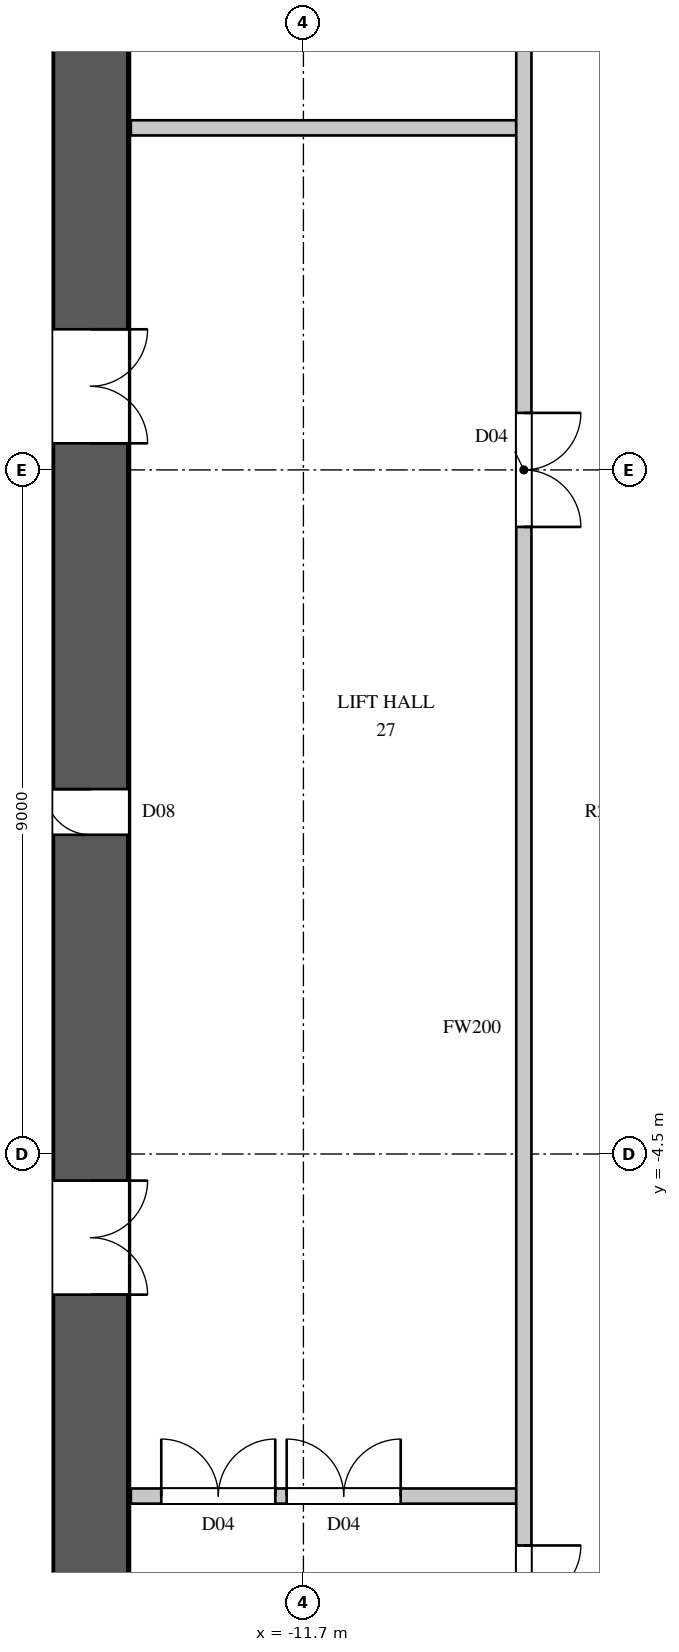
"""IFC4 building model, lengths in metres.
Left out: names, types, materials, properties, quantities, classifications, styles, units other than length and angle.
Written with IfcOpenShell. Run it as: python <this file> out.ifc"""

import sys

from ifc_helpers import new_model, si_unit, direction, frame, frame_2d, origin, place, context, subcontext, project, spatial, rectangle, extrude, element, fill, save


model = new_model("IFC4")
c1 = context("Model", 3, precision=1e-05, world=origin(), true_north=direction((0.0, 1.0)))
c2 = subcontext(c1, "Body", "Model", "MODEL_VIEW")
j1 = project(units=[si_unit("LENGTHUNIT", "METRE"), si_unit("PLANEANGLEUNIT", "RADIAN")], contexts=[c1])
p1 = place(None, origin())
s1 = spatial("IfcSite", under=j1, at=p1, CompositionType="ELEMENT")
p2 = place(p1, origin())
s2 = spatial("IfcBuilding", under=s1, at=p2, CompositionType="ELEMENT")
p3 = place(p2, frame((0.0, 0.0, 127.5)))
s3 = spatial("IfcBuildingStorey", under=s2, at=p3, CompositionType="ELEMENT", Elevation=127.5)
p4 = place(p3, frame((-14.5, -14.8, 0.0), z_axis=(0.0, 0.0, 1.0), x_axis=(0.0, 1.0, 0.0)))
e1 = element("IfcWall", 1, at=p4, inside=s3, PredefinedType="SHEAR", context=c2, shape_type="SweptSolid", body=[
    extrude(rectangle(XDim=29.6, YDim=1.0, at=frame_2d((14.8, 0.0))), origin(), (0.0, 0.0, 1.0), 3.6),
])
p5 = place(p4, frame((8.45, 0.0, 0.0)))
e2 = element("IfcOpeningElement", 2, at=p5, cuts=e1, PredefinedType="OPENING", context=c2, shape_type="SweptSolid", body=[
    extrude(rectangle(XDim=1.5, YDim=2.4, at=frame_2d((0.75, 1.2))), frame((0.0, 0.51, 0.0), z_axis=(0.0, -1.0, 0.0), x_axis=(1.0, 0.0, 0.0)), (0.0, 0.0, 1.0), 1.02),
])
p6 = place(p4, frame((19.65, 0.0, 0.0)))
e3 = element("IfcOpeningElement", 3, at=p6, cuts=e1, PredefinedType="OPENING", context=c2, shape_type="SweptSolid", body=[
    extrude(rectangle(XDim=1.5, YDim=2.4, at=frame_2d((0.75, 1.2))), frame((0.0, 0.51, 0.0), z_axis=(0.0, -1.0, 0.0), x_axis=(1.0, 0.0, 0.0)), (0.0, 0.0, 1.0), 1.02),
])
p7 = place(p4, frame((14.5, 0.0, 0.0)))
e4 = element("IfcOpeningElement", 4, at=p7, cuts=e1, PredefinedType="OPENING", context=c2, shape_type="SweptSolid", body=[
    extrude(rectangle(XDim=0.6, YDim=2.0, at=frame_2d((0.3, 1.0))), frame((0.0, 0.51, 0.0), z_axis=(0.0, -1.0, 0.0), x_axis=(1.0, 0.0, 0.0)), (0.0, 0.0, 1.0), 1.02),
])
p8 = place(p3, frame((-13.97, -9.0, 0.0), z_axis=(0.0, 0.0, 1.0), x_axis=(1.0, 0.0, 0.0)))
e5 = element("IfcWall", 5, at=p8, inside=s3, PredefinedType="PARTITIONING", context=c2, shape_type="SweptSolid", body=[
    extrude(rectangle(XDim=5.07, YDim=0.2, at=frame_2d((2.535, 0.0))), origin(), (0.0, 0.0, 1.0), 3.3),
])
p9 = place(p8, frame((0.4, 0.0, 0.0)))
e6 = element("IfcOpeningElement", 6, at=p9, cuts=e5, PredefinedType="OPENING", context=c2, shape_type="SweptSolid", body=[
    extrude(rectangle(XDim=1.5, YDim=2.2, at=frame_2d((0.75, 1.1))), frame((0.0, 0.11, 0.0), z_axis=(0.0, -1.0, 0.0), x_axis=(1.0, 0.0, 0.0)), (0.0, 0.0, 1.0), 0.22),
])
p10 = place(p8, frame((2.05, 0.0, 0.0)))
e7 = element("IfcOpeningElement", 7, at=p10, cuts=e5, PredefinedType="OPENING", context=c2, shape_type="SweptSolid", body=[
    extrude(rectangle(XDim=1.5, YDim=2.2, at=frame_2d((0.75, 1.1))), frame((0.0, 0.11, 0.0), z_axis=(0.0, -1.0, 0.0), x_axis=(1.0, 0.0, 0.0)), (0.0, 0.0, 1.0), 0.22),
])
p11 = place(p3, frame((-13.97, 9.0, 0.0), z_axis=(0.0, 0.0, 1.0), x_axis=(1.0, 0.0, 0.0)))
e8 = element("IfcWall", 8, at=p11, inside=s3, PredefinedType="PARTITIONING", context=c2, shape_type="SweptSolid", body=[
    extrude(rectangle(XDim=5.07, YDim=0.2, at=frame_2d((2.535, 0.0))), origin(), (0.0, 0.0, 1.0), 3.3),
])
p12 = place(p3, frame((-8.8, -17.4, 0.0), z_axis=(0.0, 0.0, 1.0), x_axis=(0.0, 1.0, 0.0)))
e9 = element("IfcWall", 9, at=p12, inside=s3, PredefinedType="PARTITIONING", context=c2, shape_type="SweptSolid", body=[
    extrude(rectangle(XDim=29.1, YDim=0.2, at=frame_2d((14.55, 0.0))), origin(), (0.0, 0.0, 1.0), 3.3),
])
p13 = place(p12, frame((21.15, 0.0, 0.0)))
e10 = element("IfcOpeningElement", 10, at=p13, cuts=e9, PredefinedType="OPENING", context=c2, shape_type="SweptSolid", body=[
    extrude(rectangle(XDim=1.5, YDim=2.2, at=frame_2d((0.75, 1.1))), frame((0.0, 0.11, 0.0), z_axis=(0.0, -1.0, 0.0), x_axis=(1.0, 0.0, 0.0)), (0.0, 0.0, 1.0), 0.22),
])
p14 = place(p12, frame((6.25, 0.0, 0.0)))
e11 = element("IfcOpeningElement", 11, at=p14, cuts=e9, PredefinedType="OPENING", context=c2, shape_type="SweptSolid", body=[
    extrude(rectangle(XDim=1.5, YDim=2.2, at=frame_2d((0.75, 1.1))), frame((0.0, 0.11, 0.0), z_axis=(0.0, -1.0, 0.0), x_axis=(1.0, 0.0, 0.0)), (0.0, 0.0, 1.0), 0.22),
])
p15 = place(p12, frame((27.45, 0.0, 0.0)))
e12 = element("IfcOpeningElement", 12, at=p15, cuts=e9, PredefinedType="OPENING", context=c2, shape_type="SweptSolid", body=[
    extrude(rectangle(XDim=1.5, YDim=2.2, at=frame_2d((0.75, 1.1))), frame((0.0, 0.11, 0.0), z_axis=(0.0, -1.0, 0.0), x_axis=(1.0, 0.0, 0.0)), (0.0, 0.0, 1.0), 0.22),
])
p16 = place(p12, frame((0.15, 0.0, 0.0)))
e13 = element("IfcOpeningElement", 13, at=p16, cuts=e9, PredefinedType="OPENING", context=c2, shape_type="SweptSolid", body=[
    extrude(rectangle(XDim=0.9, YDim=2.2, at=frame_2d((0.45, 1.1))), frame((0.0, 0.11, 0.0), z_axis=(0.0, -1.0, 0.0), x_axis=(1.0, 0.0, 0.0)), (0.0, 0.0, 1.0), 0.22),
])
p17 = place(p13, origin())
e14 = element("IfcDoor", 14, at=p17, inside=s3, OperationType="DOUBLE_DOOR_SINGLE_SWING", PredefinedType="DOOR", context=c2, shape_type="SweptSolid", body=[
    extrude(rectangle(XDim=1.5, YDim=2.2, at=frame_2d((0.75, 1.1))), frame((0.0, 0.025, 0.0), z_axis=(0.0, -1.0, 0.0), x_axis=(1.0, 0.0, 0.0)), (0.0, 0.0, 1.0), 0.05),
])
fill(e10, e14)
p18 = place(p9, origin())
e15 = element("IfcDoor", 15, at=p18, inside=s3, OperationType="DOUBLE_DOOR_SINGLE_SWING", PredefinedType="DOOR", context=c2, shape_type="SweptSolid", body=[
    extrude(rectangle(XDim=1.5, YDim=2.2, at=frame_2d((0.75, 1.1))), frame((0.0, 0.025, 0.0), z_axis=(0.0, -1.0, 0.0), x_axis=(1.0, 0.0, 0.0)), (0.0, 0.0, 1.0), 0.05),
])
fill(e6, e15)
p19 = place(p10, origin())
e16 = element("IfcDoor", 16, at=p19, inside=s3, OperationType="DOUBLE_DOOR_SINGLE_SWING", PredefinedType="DOOR", context=c2, shape_type="SweptSolid", body=[
    extrude(rectangle(XDim=1.5, YDim=2.2, at=frame_2d((0.75, 1.1))), frame((0.0, 0.025, 0.0), z_axis=(0.0, -1.0, 0.0), x_axis=(1.0, 0.0, 0.0)), (0.0, 0.0, 1.0), 0.05),
])
fill(e7, e16)
p20 = place(p14, origin())
e17 = element("IfcDoor", 17, at=p20, inside=s3, OperationType="DOUBLE_DOOR_SINGLE_SWING", PredefinedType="DOOR", context=c2, shape_type="SweptSolid", body=[
    extrude(rectangle(XDim=1.5, YDim=2.2, at=frame_2d((0.75, 1.1))), frame((0.0, 0.025, 0.0), z_axis=(0.0, -1.0, 0.0), x_axis=(1.0, 0.0, 0.0)), (0.0, 0.0, 1.0), 0.05),
])
fill(e11, e17)
p21 = place(p5, origin())
e18 = element("IfcDoor", 18, at=p21, inside=s3, OperationType="DOUBLE_DOOR_SINGLE_SWING", PredefinedType="DOOR", context=c2, shape_type="SweptSolid", body=[
    extrude(rectangle(XDim=1.5, YDim=2.4, at=frame_2d((0.75, 1.2))), frame((0.0, -0.445, 0.0), z_axis=(0.0, -1.0, 0.0), x_axis=(1.0, 0.0, 0.0)), (0.0, 0.0, 1.0), 0.05),
])
fill(e2, e18)
p22 = place(p6, origin())
e19 = element("IfcDoor", 19, at=p22, inside=s3, OperationType="DOUBLE_DOOR_SINGLE_SWING", PredefinedType="DOOR", context=c2, shape_type="SweptSolid", body=[
    extrude(rectangle(XDim=1.5, YDim=2.4, at=frame_2d((0.75, 1.2))), frame((0.0, -0.445, 0.0), z_axis=(0.0, -1.0, 0.0), x_axis=(1.0, 0.0, 0.0)), (0.0, 0.0, 1.0), 0.05),
])
fill(e3, e19)
p23 = place(p7, origin())
e20 = element("IfcDoor", 20, at=p23, inside=s3, OperationType="SINGLE_SWING_RIGHT", PredefinedType="DOOR", context=c2, shape_type="SweptSolid", body=[
    extrude(rectangle(XDim=0.6, YDim=2.0, at=frame_2d((0.3, 1.0))), frame((0.0, 0.495, 0.0), z_axis=(0.0, -1.0, 0.0), x_axis=(1.0, 0.0, 0.0)), (0.0, 0.0, 1.0), 0.05),
])
fill(e4, e20)
save(model, sys.argv[1])
